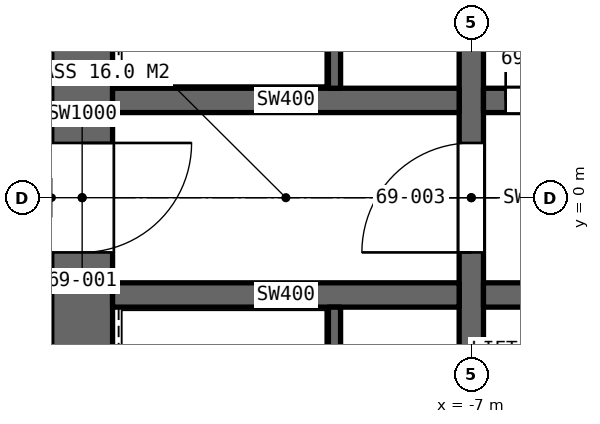
"""IFC4 building model, lengths in metres.
Left out: names, types, materials, properties, quantities, classifications, styles, units other than length and angle.
Written with IfcOpenShell. Run it as: python <this file> out.ifc"""

import sys

from ifc_helpers import new_model, si_unit, direction, frame, frame_2d, origin, place, context, subcontext, project, spatial, rectangle, extrude, element, fill, save


model = new_model("IFC4")
c1 = context("Model", 3, precision=1e-05, world=origin(), true_north=direction((0.0, 1.0)))
c2 = subcontext(c1, "Body", "Model", "MODEL_VIEW")
j1 = project(units=[si_unit("LENGTHUNIT", "METRE"), si_unit("PLANEANGLEUNIT", "RADIAN")], contexts=[c1])
p1 = place(None, origin())
s1 = spatial("IfcSite", under=j1, at=p1, CompositionType="ELEMENT")
p2 = place(p1, origin())
s2 = spatial("IfcBuilding", under=s1, at=p2, CompositionType="ELEMENT")
p3 = place(p2, frame((0.0, 0.0, 309.0)))
s3 = spatial("IfcBuildingStorey", under=s2, at=p3, CompositionType="ELEMENT", Elevation=309.0)
p4 = place(p3, frame((-13.4, 8.9, 0.0), z_axis=(0.0, 0.0, 1.0), x_axis=(0.0, -1.0, 0.0)))
e1 = element("IfcWall", 1, at=p4, inside=s3, PredefinedType="SHEAR", context=c2, shape_type="SweptSolid", body=[
    extrude(rectangle(XDim=17.8, YDim=1.0, at=frame_2d((8.9, 0.0))), origin(), (0.0, 0.0, 1.0), 4.2),
])
p5 = place(p4, frame((8.0, 0.0, 0.0)))
e2 = element("IfcOpeningElement", 2, at=p5, cuts=e1, PredefinedType="OPENING", context=c2, shape_type="SweptSolid", body=[
    extrude(rectangle(XDim=1.8, YDim=2.4, at=frame_2d((0.9, 1.2))), frame((0.0, 0.51, 0.0), z_axis=(0.0, -1.0, 0.0), x_axis=(1.0, 0.0, 0.0)), (0.0, 0.0, 1.0), 1.02),
])
p6 = place(p4, frame((16.6, 0.0, 0.0)))
e3 = element("IfcOpeningElement", 3, at=p6, cuts=e1, PredefinedType="OPENING", context=c2, shape_type="SweptSolid", body=[
    extrude(rectangle(XDim=1.0, YDim=2.4, at=frame_2d((0.5, 1.2))), frame((0.0, 0.51, 0.0), z_axis=(0.0, -1.0, 0.0), x_axis=(1.0, 0.0, 0.0)), (0.0, 0.0, 1.0), 1.02),
])
p7 = place(p3, frame((-7.0, -8.9, 0.0), z_axis=(0.0, 0.0, 1.0), x_axis=(0.0, 1.0, 0.0)))
e4 = element("IfcWall", 4, at=p7, inside=s3, PredefinedType="SHEAR", context=c2, shape_type="SweptSolid", body=[
    extrude(rectangle(XDim=17.8, YDim=0.4, at=frame_2d((8.9, 0.0))), origin(), (0.0, 0.0, 1.0), 4.2),
])
p8 = place(p7, frame((8.0, 0.0, 0.0)))
e5 = element("IfcOpeningElement", 5, at=p8, cuts=e4, PredefinedType="OPENING", context=c2, shape_type="SweptSolid", body=[
    extrude(rectangle(XDim=1.8, YDim=2.4, at=frame_2d((0.9, 1.2))), frame((0.0, 0.21, 0.0), z_axis=(0.0, -1.0, 0.0), x_axis=(1.0, 0.0, 0.0)), (0.0, 0.0, 1.0), 0.42),
])
p9 = place(p3, frame((-6.8, 1.6, 0.0), z_axis=(0.0, 0.0, 1.0), x_axis=(1.0, 0.0, 0.0)))
e6 = element("IfcWall", 6, at=p9, inside=s3, PredefinedType="SHEAR", context=c2, shape_type="SweptSolid", body=[
    extrude(rectangle(XDim=13.6, YDim=0.4, at=frame_2d((6.8, 0.0))), origin(), (0.0, 0.0, 1.0), 4.2),
])
p10 = place(p9, frame((0.365, 0.0, 0.0)))
e7 = element("IfcOpeningElement", 7, at=p10, cuts=e6, PredefinedType="OPENING", context=c2, shape_type="SweptSolid", body=[
    extrude(rectangle(XDim=1.0, YDim=2.4, at=frame_2d((0.5, 1.2))), frame((0.0, 0.21, 0.0), z_axis=(0.0, -1.0, 0.0), x_axis=(1.0, 0.0, 0.0)), (0.0, 0.0, 1.0), 0.42),
])
p11 = place(p9, frame((4.1, 0.0, 0.0)))
e8 = element("IfcOpeningElement", 8, at=p11, cuts=e6, PredefinedType="OPENING", context=c2, shape_type="SweptSolid", body=[
    extrude(rectangle(XDim=1.0, YDim=2.4, at=frame_2d((0.5, 1.2))), frame((0.0, 0.21, 0.0), z_axis=(0.0, -1.0, 0.0), x_axis=(1.0, 0.0, 0.0)), (0.0, 0.0, 1.0), 0.42),
])
p12 = place(p9, frame((8.635, 0.0, 0.0)))
e9 = element("IfcOpeningElement", 9, at=p12, cuts=e6, PredefinedType="OPENING", context=c2, shape_type="SweptSolid", body=[
    extrude(rectangle(XDim=1.0, YDim=2.4, at=frame_2d((0.5, 1.2))), frame((0.0, 0.21, 0.0), z_axis=(0.0, -1.0, 0.0), x_axis=(1.0, 0.0, 0.0)), (0.0, 0.0, 1.0), 0.42),
])
p13 = place(p9, frame((11.9, 0.0, 0.0)))
e10 = element("IfcOpeningElement", 10, at=p13, cuts=e6, PredefinedType="OPENING", context=c2, shape_type="SweptSolid", body=[
    extrude(rectangle(XDim=1.0, YDim=2.4, at=frame_2d((0.5, 1.2))), frame((0.0, 0.21, 0.0), z_axis=(0.0, -1.0, 0.0), x_axis=(1.0, 0.0, 0.0)), (0.0, 0.0, 1.0), 0.42),
])
p14 = place(p3, frame((-6.8, -1.6, 0.0), z_axis=(0.0, 0.0, 1.0), x_axis=(1.0, 0.0, 0.0)))
e11 = element("IfcWall", 11, at=p14, inside=s3, PredefinedType="SHEAR", context=c2, shape_type="SweptSolid", body=[
    extrude(rectangle(XDim=13.6, YDim=0.4, at=frame_2d((6.8, 0.0))), origin(), (0.0, 0.0, 1.0), 4.2),
])
p15 = place(p14, frame((11.95, 0.0, 0.0)))
e12 = element("IfcOpeningElement", 12, at=p15, cuts=e11, PredefinedType="OPENING", context=c2, shape_type="SweptSolid", body=[
    extrude(rectangle(XDim=0.9, YDim=2.4, at=frame_2d((0.45, 1.2))), frame((0.0, 0.21, 0.0), z_axis=(0.0, -1.0, 0.0), x_axis=(1.0, 0.0, 0.0)), (0.0, 0.0, 1.0), 0.42),
])
p16 = place(p14, frame((4.5, 0.0, 0.0)))
e13 = element("IfcOpeningElement", 13, at=p16, cuts=e11, PredefinedType="OPENING", context=c2, shape_type="SweptSolid", body=[
    extrude(rectangle(XDim=1.8, YDim=2.4, at=frame_2d((0.9, 1.2))), frame((0.0, 0.21, 0.0), z_axis=(0.0, -1.0, 0.0), x_axis=(1.0, 0.0, 0.0)), (0.0, 0.0, 1.0), 0.42),
])
for number, where, z_axis, x_axis in (
    (14, (-12.9, 1.6, 0.0), (0.0, 0.0, 1.0), (1.0, 0.0, 0.0)),
    (15, (-12.9, -1.6, 0.0), (0.0, 0.0, 1.0), (1.0, 0.0, 0.0)),
):
    element("IfcWall", number, at=place(p3, frame(where, z_axis=z_axis, x_axis=x_axis)), inside=s3, PredefinedType="SHEAR", context=c2, shape_type="SweptSolid", body=[
        extrude(rectangle(XDim=5.7, YDim=0.4, at=frame_2d((2.85, 0.0))), origin(), (0.0, 0.0, 1.0), 4.2),
    ])
for number, where, z_axis, x_axis in (
    (16, (-9.25, 7.2, 0.0), (0.0, 0.0, 1.0), (0.0, -1.0, 0.0)),
    (17, (-9.25, -7.2, 0.0), (0.0, 0.0, 1.0), (0.0, 1.0, 0.0)),
):
    element("IfcWall", number, at=place(p3, frame(where, z_axis=z_axis, x_axis=x_axis)), inside=s3, PredefinedType="SOLIDWALL", context=c2, shape_type="SweptSolid", body=[
        extrude(rectangle(XDim=5.4, YDim=0.2, at=frame_2d((2.7, 0.0))), origin(), (0.0, 0.0, 1.0), 4.2),
    ])
p17 = place(p5, origin())
e18 = element("IfcDoor", 18, at=p17, inside=s3, OperationType="DOUBLE_DOOR_SINGLE_SWING", PredefinedType="DOOR", context=c2, shape_type="SweptSolid", body=[
    extrude(rectangle(XDim=1.8, YDim=2.4, at=frame_2d((0.9, 1.2))), frame((0.0, 0.025, 0.0), z_axis=(0.0, -1.0, 0.0), x_axis=(1.0, 0.0, 0.0)), (0.0, 0.0, 1.0), 0.05),
])
fill(e2, e18)
p18 = place(p8, origin())
e19 = element("IfcDoor", 19, at=p18, inside=s3, OperationType="DOUBLE_DOOR_SINGLE_SWING", PredefinedType="DOOR", context=c2, shape_type="SweptSolid", body=[
    extrude(rectangle(XDim=1.8, YDim=2.4, at=frame_2d((0.9, 1.2))), frame((0.0, 0.025, 0.0), z_axis=(0.0, -1.0, 0.0), x_axis=(1.0, 0.0, 0.0)), (0.0, 0.0, 1.0), 0.05),
])
fill(e5, e19)
p19 = place(p10, origin())
e20 = element("IfcDoor", 20, at=p19, inside=s3, OperationType="SINGLE_SWING_LEFT", PredefinedType="DOOR", context=c2, shape_type="SweptSolid", body=[
    extrude(rectangle(XDim=1.0, YDim=2.4, at=frame_2d((0.5, 1.2))), frame((0.0, 0.025, 0.0), z_axis=(0.0, -1.0, 0.0), x_axis=(1.0, 0.0, 0.0)), (0.0, 0.0, 1.0), 0.05),
])
fill(e7, e20)
save(model, sys.argv[1])
